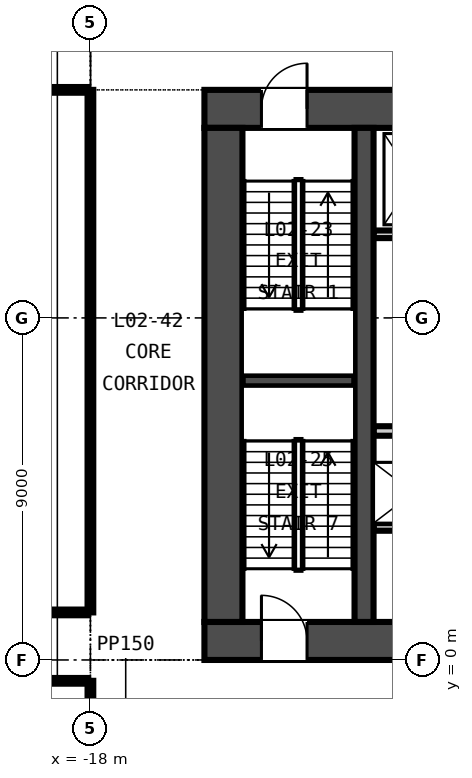
"""IFC4 building model, lengths in metres.
Left out: names, types, materials, properties, quantities, classifications, styles, units other than length and angle.
Written with IfcOpenShell. Run it as: python <this file> out.ifc"""

import sys

from ifc_helpers import new_model, si_unit, direction, frame, frame_2d, origin, place, context, subcontext, project, spatial, rectangle, extrude, element, fill, save


model = new_model("IFC4")
c1 = context("Model", 3, precision=1e-05, world=origin(), true_north=direction((0.0, 1.0)))
c2 = subcontext(c1, "Body", "Model", "MODEL_VIEW")
j1 = project(units=[si_unit("LENGTHUNIT", "METRE"), si_unit("PLANEANGLEUNIT", "RADIAN")], contexts=[c1])
p1 = place(None, origin())
s1 = spatial("IfcSite", under=j1, at=p1, CompositionType="ELEMENT")
p2 = place(p1, origin())
s2 = spatial("IfcBuilding", under=s1, at=p2, CompositionType="ELEMENT")
p3 = place(p2, frame((0.0, 0.0, 18.0)))
s3 = spatial("IfcBuildingStorey", under=s2, at=p3, CompositionType="ELEMENT", Elevation=18.0)
p4 = place(p3, frame((-15.0, 0.5, -0.4), z_axis=(0.0, 0.0, 1.0), x_axis=(1.0, 0.0, 0.0)))
e1 = element("IfcWall", 1, at=p4, inside=s3, PredefinedType="SOLIDWALL", context=c2, shape_type="SweptSolid", body=[
    extrude(rectangle(XDim=30.0, YDim=1.0, at=frame_2d((15.0, 0.0))), origin(), (0.0, 0.0, 1.0), 4.6),
])
p5 = place(p4, frame((5.8, 0.0, 0.4)))
e2 = element("IfcOpeningElement", 2, at=p5, cuts=e1, PredefinedType="OPENING", context=c2, shape_type="SweptSolid", body=[
    extrude(rectangle(XDim=2.4, YDim=2.4, at=frame_2d((1.2, 1.2))), frame((0.0, 0.51, 0.0), z_axis=(0.0, -1.0, 0.0), x_axis=(1.0, 0.0, 0.0)), (0.0, 0.0, 1.0), 1.02),
])
p6 = place(p4, frame((13.8, 0.0, 0.4)))
e3 = element("IfcOpeningElement", 3, at=p6, cuts=e1, PredefinedType="OPENING", context=c2, shape_type="SweptSolid", body=[
    extrude(rectangle(XDim=2.4, YDim=2.4, at=frame_2d((1.2, 1.2))), frame((0.0, 0.51, 0.0), z_axis=(0.0, -1.0, 0.0), x_axis=(1.0, 0.0, 0.0)), (0.0, 0.0, 1.0), 1.02),
])
p7 = place(p4, frame((21.8, 0.0, 0.4)))
e4 = element("IfcOpeningElement", 4, at=p7, cuts=e1, PredefinedType="OPENING", context=c2, shape_type="SweptSolid", body=[
    extrude(rectangle(XDim=2.4, YDim=2.4, at=frame_2d((1.2, 1.2))), frame((0.0, 0.51, 0.0), z_axis=(0.0, -1.0, 0.0), x_axis=(1.0, 0.0, 0.0)), (0.0, 0.0, 1.0), 1.02),
])
p8 = place(p4, frame((1.5, 0.0, 0.4)))
e5 = element("IfcOpeningElement", 5, at=p8, cuts=e1, PredefinedType="OPENING", context=c2, shape_type="SweptSolid", body=[
    extrude(rectangle(XDim=1.2, YDim=2.1, at=frame_2d((0.6, 1.05))), frame((0.0, 0.51, 0.0), z_axis=(0.0, -1.0, 0.0), x_axis=(1.0, 0.0, 0.0)), (0.0, 0.0, 1.0), 1.02),
])
p9 = place(p4, frame((27.3, 0.0, 0.4)))
e6 = element("IfcOpeningElement", 6, at=p9, cuts=e1, PredefinedType="OPENING", context=c2, shape_type="SweptSolid", body=[
    extrude(rectangle(XDim=1.2, YDim=2.1, at=frame_2d((0.6, 1.05))), frame((0.0, 0.51, 0.0), z_axis=(0.0, -1.0, 0.0), x_axis=(1.0, 0.0, 0.0)), (0.0, 0.0, 1.0), 1.02),
])
p10 = place(p3, frame((-15.0, 14.5, -0.4), z_axis=(0.0, 0.0, 1.0), x_axis=(1.0, 0.0, 0.0)))
e7 = element("IfcWall", 7, at=p10, inside=s3, PredefinedType="SOLIDWALL", context=c2, shape_type="SweptSolid", body=[
    extrude(rectangle(XDim=30.0, YDim=1.0, at=frame_2d((15.0, 0.0))), origin(), (0.0, 0.0, 1.0), 4.6),
])
p11 = place(p10, frame((9.25, 0.0, 0.4)))
e8 = element("IfcOpeningElement", 8, at=p11, cuts=e7, PredefinedType="OPENING", context=c2, shape_type="SweptSolid", body=[
    extrude(rectangle(XDim=1.5, YDim=2.1, at=frame_2d((0.75, 1.05))), frame((0.0, 0.51, 0.0), z_axis=(0.0, -1.0, 0.0), x_axis=(1.0, 0.0, 0.0)), (0.0, 0.0, 1.0), 1.02),
])
p12 = place(p10, frame((19.4, 0.0, 0.4)))
e9 = element("IfcOpeningElement", 9, at=p12, cuts=e7, PredefinedType="OPENING", context=c2, shape_type="SweptSolid", body=[
    extrude(rectangle(XDim=1.5, YDim=2.1, at=frame_2d((0.75, 1.05))), frame((0.0, 0.51, 0.0), z_axis=(0.0, -1.0, 0.0), x_axis=(1.0, 0.0, 0.0)), (0.0, 0.0, 1.0), 1.02),
])
p13 = place(p10, frame((1.5, 0.0, 0.4)))
e10 = element("IfcOpeningElement", 10, at=p13, cuts=e7, PredefinedType="OPENING", context=c2, shape_type="SweptSolid", body=[
    extrude(rectangle(XDim=1.2, YDim=2.1, at=frame_2d((0.6, 1.05))), frame((0.0, 0.51, 0.0), z_axis=(0.0, -1.0, 0.0), x_axis=(1.0, 0.0, 0.0)), (0.0, 0.0, 1.0), 1.02),
])
p14 = place(p10, frame((27.3, 0.0, 0.4)))
e11 = element("IfcOpeningElement", 11, at=p14, cuts=e7, PredefinedType="OPENING", context=c2, shape_type="SweptSolid", body=[
    extrude(rectangle(XDim=1.2, YDim=2.1, at=frame_2d((0.6, 1.05))), frame((0.0, 0.51, 0.0), z_axis=(0.0, -1.0, 0.0), x_axis=(1.0, 0.0, 0.0)), (0.0, 0.0, 1.0), 1.02),
])
p15 = place(p3, frame((-14.5, 1.0, -0.4), z_axis=(0.0, 0.0, 1.0), x_axis=(0.0, 1.0, 0.0)))
e12 = element("IfcWall", 12, at=p15, inside=s3, PredefinedType="SOLIDWALL", context=c2, shape_type="SweptSolid", body=[
    extrude(rectangle(XDim=13.0, YDim=1.0, at=frame_2d((6.5, 0.0))), origin(), (0.0, 0.0, 1.0), 4.6),
])
p16 = place(p3, frame((-10.8, 1.0, -0.4), z_axis=(0.0, 0.0, 1.0), x_axis=(0.0, 1.0, 0.0)))
e13 = element("IfcWall", 13, at=p16, inside=s3, PredefinedType="SOLIDWALL", context=c2, shape_type="SweptSolid", body=[
    extrude(rectangle(XDim=13.0, YDim=0.5, at=frame_2d((6.5, 0.0))), origin(), (0.0, 0.0, 1.0), 4.6),
])
p17 = place(p3, frame((-10.55, 3.5, 0.0), z_axis=(0.0, 0.0, 1.0), x_axis=(1.0, 0.0, 0.0)))
e14 = element("IfcWall", 14, at=p17, inside=s3, PredefinedType="PARTITIONING", context=c2, shape_type="SweptSolid", body=[
    extrude(rectangle(XDim=21.1, YDim=0.2, at=frame_2d((10.55, 0.0))), origin(), (0.0, 0.0, 1.0), 4.2),
])
p18 = place(p17, frame((0.675, 0.0, 0.0)))
e15 = element("IfcOpeningElement", 15, at=p18, cuts=e14, PredefinedType="OPENING", context=c2, shape_type="SweptSolid", body=[
    extrude(rectangle(XDim=1.2, YDim=2.1, at=frame_2d((0.6, 1.05))), frame((0.0, 0.11, 0.0), z_axis=(0.0, -1.0, 0.0), x_axis=(1.0, 0.0, 0.0)), (0.0, 0.0, 1.0), 0.22),
])
p19 = place(p17, frame((3.475, 0.0, 0.0)))
e16 = element("IfcOpeningElement", 16, at=p19, cuts=e14, PredefinedType="OPENING", context=c2, shape_type="SweptSolid", body=[
    extrude(rectangle(XDim=1.2, YDim=2.1, at=frame_2d((0.6, 1.05))), frame((0.0, 0.11, 0.0), z_axis=(0.0, -1.0, 0.0), x_axis=(1.0, 0.0, 0.0)), (0.0, 0.0, 1.0), 0.22),
])
p20 = place(p17, frame((6.275, 0.0, 0.0)))
e17 = element("IfcOpeningElement", 17, at=p20, cuts=e14, PredefinedType="OPENING", context=c2, shape_type="SweptSolid", body=[
    extrude(rectangle(XDim=1.2, YDim=2.1, at=frame_2d((0.6, 1.05))), frame((0.0, 0.11, 0.0), z_axis=(0.0, -1.0, 0.0), x_axis=(1.0, 0.0, 0.0)), (0.0, 0.0, 1.0), 0.22),
])
p21 = place(p17, frame((9.075, 0.0, 0.0)))
e18 = element("IfcOpeningElement", 18, at=p21, cuts=e14, PredefinedType="OPENING", context=c2, shape_type="SweptSolid", body=[
    extrude(rectangle(XDim=1.2, YDim=2.1, at=frame_2d((0.6, 1.05))), frame((0.0, 0.11, 0.0), z_axis=(0.0, -1.0, 0.0), x_axis=(1.0, 0.0, 0.0)), (0.0, 0.0, 1.0), 0.22),
])
p22 = place(p17, frame((11.875, 0.0, 0.0)))
e19 = element("IfcOpeningElement", 19, at=p22, cuts=e14, PredefinedType="OPENING", context=c2, shape_type="SweptSolid", body=[
    extrude(rectangle(XDim=1.2, YDim=2.1, at=frame_2d((0.6, 1.05))), frame((0.0, 0.11, 0.0), z_axis=(0.0, -1.0, 0.0), x_axis=(1.0, 0.0, 0.0)), (0.0, 0.0, 1.0), 0.22),
])
p23 = place(p17, frame((14.675, 0.0, 0.0)))
e20 = element("IfcOpeningElement", 20, at=p23, cuts=e14, PredefinedType="OPENING", context=c2, shape_type="SweptSolid", body=[
    extrude(rectangle(XDim=1.2, YDim=2.1, at=frame_2d((0.6, 1.05))), frame((0.0, 0.11, 0.0), z_axis=(0.0, -1.0, 0.0), x_axis=(1.0, 0.0, 0.0)), (0.0, 0.0, 1.0), 0.22),
])
p24 = place(p17, frame((17.475, 0.0, 0.0)))
e21 = element("IfcOpeningElement", 21, at=p24, cuts=e14, PredefinedType="OPENING", context=c2, shape_type="SweptSolid", body=[
    extrude(rectangle(XDim=1.2, YDim=2.1, at=frame_2d((0.6, 1.05))), frame((0.0, 0.11, 0.0), z_axis=(0.0, -1.0, 0.0), x_axis=(1.0, 0.0, 0.0)), (0.0, 0.0, 1.0), 0.22),
])
p25 = place(p17, frame((19.9, 0.0, 0.0)))
e22 = element("IfcOpeningElement", 22, at=p25, cuts=e14, PredefinedType="OPENING", context=c2, shape_type="SweptSolid", body=[
    extrude(rectangle(XDim=0.9, YDim=2.1, at=frame_2d((0.45, 1.05))), frame((0.0, 0.11, 0.0), z_axis=(0.0, -1.0, 0.0), x_axis=(1.0, 0.0, 0.0)), (0.0, 0.0, 1.0), 0.22),
])
p26 = place(p3, frame((-10.55, 6.025, 0.0), z_axis=(0.0, 0.0, 1.0), x_axis=(1.0, 0.0, 0.0)))
e23 = element("IfcWall", 23, at=p26, inside=s3, PredefinedType="PARTITIONING", context=c2, shape_type="SweptSolid", body=[
    extrude(rectangle(XDim=21.1, YDim=0.25, at=frame_2d((10.55, 0.0))), origin(), (0.0, 0.0, 1.0), 4.2),
])
p27 = place(p3, frame((-10.55, 11.2, 0.0), z_axis=(0.0, 0.0, 1.0), x_axis=(1.0, 0.0, 0.0)))
e24 = element("IfcWall", 24, at=p27, inside=s3, PredefinedType="PARTITIONING", context=c2, shape_type="SweptSolid", body=[
    extrude(rectangle(XDim=4.8, YDim=0.2, at=frame_2d((2.4, 0.0))), origin(), (0.0, 0.0, 1.0), 4.2),
])
p28 = place(p27, frame((0.525, 0.0, 0.0)))
e25 = element("IfcOpeningElement", 25, at=p28, cuts=e24, PredefinedType="OPENING", context=c2, shape_type="SweptSolid", body=[
    extrude(rectangle(XDim=1.1, YDim=2.1, at=frame_2d((0.55, 1.05))), frame((0.0, 0.11, 0.0), z_axis=(0.0, -1.0, 0.0), x_axis=(1.0, 0.0, 0.0)), (0.0, 0.0, 1.0), 0.22),
])
p29 = place(p27, frame((2.925, 0.0, 0.0)))
e26 = element("IfcOpeningElement", 26, at=p29, cuts=e24, PredefinedType="OPENING", context=c2, shape_type="SweptSolid", body=[
    extrude(rectangle(XDim=1.1, YDim=2.1, at=frame_2d((0.55, 1.05))), frame((0.0, 0.11, 0.0), z_axis=(0.0, -1.0, 0.0), x_axis=(1.0, 0.0, 0.0)), (0.0, 0.0, 1.0), 0.22),
])
p30 = place(p3, frame((-14.0, 7.35, -0.4), z_axis=(0.0, 0.0, 1.0), x_axis=(1.0, 0.0, 0.0)))
e27 = element("IfcWall", 27, at=p30, inside=s3, PredefinedType="SOLIDWALL", context=c2, shape_type="SweptSolid", body=[
    extrude(rectangle(XDim=2.95, YDim=0.3, at=frame_2d((1.475, 0.0))), origin(), (0.0, 0.0, 1.0), 4.6),
])
p31 = place(p3, frame((-22.125, -0.549, 0.0), z_axis=(0.0, 0.0, 1.0), x_axis=(1.0, 0.0, 0.0)))
e28 = element("IfcWall", 28, at=p31, inside=s3, PredefinedType="PARTITIONING", context=c2, shape_type="SweptSolid", body=[
    extrude(rectangle(XDim=4.05, YDim=0.15, at=frame_2d((2.025, 0.0))), origin(), (0.0, 0.0, 1.0), 4.2),
])
p32 = place(p31, frame((1.4, 0.0, 0.0)))
e29 = element("IfcOpeningElement", 29, at=p32, cuts=e28, PredefinedType="OPENING", context=c2, shape_type="SweptSolid", body=[
    extrude(rectangle(XDim=1.0, YDim=2.1, at=frame_2d((0.5, 1.05))), frame((0.0, 0.085, 0.0), z_axis=(0.0, -1.0, 0.0), x_axis=(1.0, 0.0, 0.0)), (0.0, 0.0, 1.0), 0.17),
])
p33 = place(p3, frame((-23.725, 1.251, 0.0), z_axis=(0.0, 0.0, 1.0), x_axis=(1.0, 0.0, 0.0)))
e30 = element("IfcWall", 30, at=p33, inside=s3, PredefinedType="PARTITIONING", context=c2, shape_type="SweptSolid", body=[
    extrude(rectangle(XDim=5.65, YDim=0.15, at=frame_2d((2.825, 0.0))), origin(), (0.0, 0.0, 1.0), 4.2),
])
p34 = place(p3, frame((-27.035, 15.0, 0.0), z_axis=(0.0, 0.0, 1.0), x_axis=(1.0, 0.0, 0.0)))
e31 = element("IfcWall", 31, at=p34, inside=s3, PredefinedType="PARTITIONING", context=c2, shape_type="SweptSolid", body=[
    extrude(rectangle(XDim=8.96, YDim=0.15, at=frame_2d((4.48, 0.0))), origin(), (0.0, 0.0, 1.0), 4.2),
])
p35 = place(p3, frame((-18.0, -3.2, 0.0), z_axis=(0.0, 0.0, 1.0), x_axis=(0.0, 1.0, 0.0)))
e32 = element("IfcWall", 32, at=p35, inside=s3, PredefinedType="PARTITIONING", context=c2, shape_type="SweptSolid", body=[
    extrude(rectangle(XDim=2.651, YDim=0.15, at=frame_2d((1.326, 0.0))), origin(), (0.0, 0.0, 1.0), 4.2),
])
p36 = place(p3, frame((-18.0, 1.251, 0.0), z_axis=(0.0, 0.0, 1.0), x_axis=(0.0, 1.0, 0.0)))
e33 = element("IfcWall", 33, at=p36, inside=s3, PredefinedType="PARTITIONING", context=c2, shape_type="SweptSolid", body=[
    extrude(rectangle(XDim=13.749, YDim=0.15, at=frame_2d((6.875, 0.0))), origin(), (0.0, 0.0, 1.0), 4.2),
])
p37 = place(p13, origin())
e34 = element("IfcDoor", 34, at=p37, inside=s3, OperationType="SINGLE_SWING_RIGHT", PredefinedType="DOOR", context=c2, shape_type="SweptSolid", body=[
    extrude(rectangle(XDim=1.2, YDim=2.1, at=frame_2d((0.6, 1.05))), frame((0.0, 0.025, 0.0), z_axis=(0.0, -1.0, 0.0), x_axis=(1.0, 0.0, 0.0)), (0.0, 0.0, 1.0), 0.05),
])
fill(e10, e34)
p38 = place(p8, origin())
e35 = element("IfcDoor", 35, at=p38, inside=s3, OperationType="SINGLE_SWING_LEFT", PredefinedType="DOOR", context=c2, shape_type="SweptSolid", body=[
    extrude(rectangle(XDim=1.2, YDim=2.1, at=frame_2d((0.6, 1.05))), frame((0.0, 0.025, 0.0), z_axis=(0.0, -1.0, 0.0), x_axis=(1.0, 0.0, 0.0)), (0.0, 0.0, 1.0), 0.05),
])
fill(e5, e35)
save(model, sys.argv[1])
